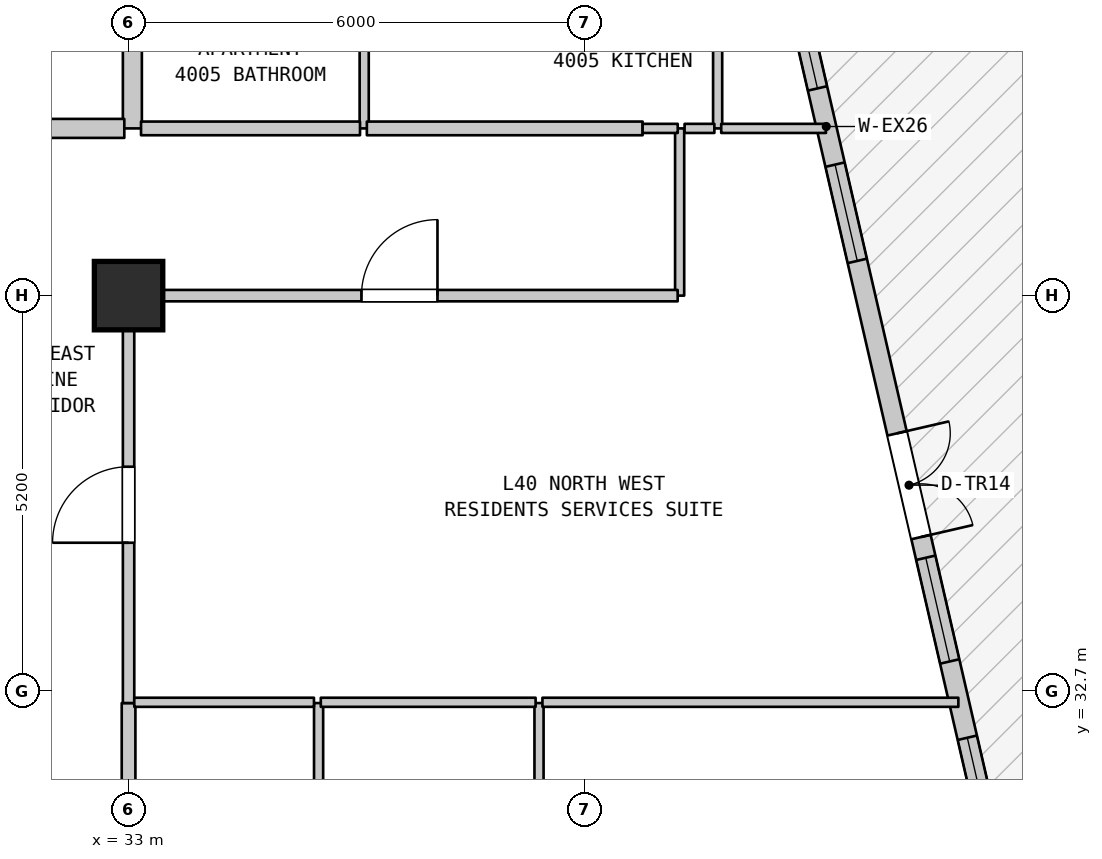
"""IFC4 building model, lengths in metres.
Left out: names, types, materials, properties, quantities, classifications, styles, units other than length and angle.
Written with IfcOpenShell. Run it as: python <this file> out.ifc"""

import sys

from ifc_helpers import new_model, si_unit, direction, frame, frame_2d, origin, origin_2d, place, context, subcontext, project, spatial, rectangle, extrude, element, fill, save


model = new_model("IFC4")
c1 = context("Model", 3, precision=1e-05, world=origin(), true_north=direction((0.0, 1.0)))
c2 = subcontext(c1, "Body", "Model", "MODEL_VIEW")
j1 = project(units=[si_unit("LENGTHUNIT", "METRE"), si_unit("PLANEANGLEUNIT", "RADIAN")], contexts=[c1])
p1 = place(None, origin())
s1 = spatial("IfcSite", under=j1, at=p1, CompositionType="ELEMENT")
p2 = place(p1, origin())
s2 = spatial("IfcBuilding", under=s1, at=p2, CompositionType="ELEMENT")
p3 = place(p2, frame((0.0, 0.0, 164.6)))
s3 = spatial("IfcBuildingStorey", under=s2, at=p3, CompositionType="ELEMENT", Elevation=164.6)
p4 = place(p3, frame((33.0, 37.9, 0.0), z_axis=(0.0, 0.0, 1.0), x_axis=(1.0, 0.0, 0.0)))
e1 = element("IfcColumn", 1, at=p4, inside=s3, PredefinedType="COLUMN", context=c2, shape_type="SweptSolid", body=[
    extrude(rectangle(XDim=0.9, YDim=0.9, at=origin_2d()), origin(), (0.0, 0.0, 1.0), 4.5),
])
p5 = place(p3, frame((39.358, 52.35, 0.0), z_axis=(0.0, 0.0, 1.0), x_axis=(0.224849558511, -0.974393491377, 0.0)))
e2 = element("IfcWall", 2, at=p5, inside=s3, PredefinedType="STANDARD", context=c2, shape_type="SweptSolid", body=[
    extrude(rectangle(XDim=25.093, YDim=0.26, at=frame_2d((12.546, 0.0))), origin(), (0.0, 0.0, 1.0), 4.19),
])
p6 = place(p5, frame((16.689, 0.0, 0.0)))
e3 = element("IfcOpeningElement", 3, at=p6, cuts=e2, PredefinedType="OPENING", context=c2, shape_type="SweptSolid", body=[
    extrude(rectangle(XDim=1.4, YDim=2.2, at=frame_2d((0.7, 1.1))), frame((0.0, 0.14, 0.0), z_axis=(0.0, -1.0, 0.0), x_axis=(1.0, 0.0, 0.0)), (0.0, 0.0, 1.0), 0.28),
])
p7 = place(p5, frame((0.915, 0.0, 0.9)))
e4 = element("IfcOpeningElement", 4, at=p7, cuts=e2, PredefinedType="OPENING", context=c2, shape_type="SweptSolid", body=[
    extrude(rectangle(XDim=1.4, YDim=1.85, at=frame_2d((0.7, 0.925))), frame((0.0, 0.14, 0.0), z_axis=(0.0, -1.0, 0.0), x_axis=(1.0, 0.0, 0.0)), (0.0, 0.0, 1.0), 0.28),
])
p8 = place(p5, frame((3.344, 0.0, 0.9)))
e5 = element("IfcOpeningElement", 5, at=p8, cuts=e2, PredefinedType="OPENING", context=c2, shape_type="SweptSolid", body=[
    extrude(rectangle(XDim=1.3, YDim=1.9, at=frame_2d((0.65, 0.95))), frame((0.0, 0.14, 0.0), z_axis=(0.0, -1.0, 0.0), x_axis=(1.0, 0.0, 0.0)), (0.0, 0.0, 1.0), 0.28),
])
p9 = place(p5, frame((5.323, 0.0, 0.9)))
e6 = element("IfcOpeningElement", 6, at=p9, cuts=e2, PredefinedType="OPENING", context=c2, shape_type="SweptSolid", body=[
    extrude(rectangle(XDim=1.4, YDim=1.85, at=frame_2d((0.7, 0.925))), frame((0.0, 0.14, 0.0), z_axis=(0.0, -1.0, 0.0), x_axis=(1.0, 0.0, 0.0)), (0.0, 0.0, 1.0), 0.28),
])
p10 = place(p5, frame((8.202, 0.0, 0.9)))
e7 = element("IfcOpeningElement", 7, at=p10, cuts=e2, PredefinedType="OPENING", context=c2, shape_type="SweptSolid", body=[
    extrude(rectangle(XDim=1.3, YDim=1.9, at=frame_2d((0.65, 0.95))), frame((0.0, 0.14, 0.0), z_axis=(0.0, -1.0, 0.0), x_axis=(1.0, 0.0, 0.0)), (0.0, 0.0, 1.0), 0.28),
])
p11 = place(p5, frame((10.632, 0.0, 0.9)))
e8 = element("IfcOpeningElement", 8, at=p11, cuts=e2, PredefinedType="OPENING", context=c2, shape_type="SweptSolid", body=[
    extrude(rectangle(XDim=1.4, YDim=1.85, at=frame_2d((0.7, 0.925))), frame((0.0, 0.14, 0.0), z_axis=(0.0, -1.0, 0.0), x_axis=(1.0, 0.0, 0.0)), (0.0, 0.0, 1.0), 0.28),
])
p12 = place(p5, frame((13.061, 0.0, 0.9)))
e9 = element("IfcOpeningElement", 9, at=p12, cuts=e2, PredefinedType="OPENING", context=c2, shape_type="SweptSolid", body=[
    extrude(rectangle(XDim=1.3, YDim=1.9, at=frame_2d((0.65, 0.95))), frame((0.0, 0.14, 0.0), z_axis=(0.0, -1.0, 0.0), x_axis=(1.0, 0.0, 0.0)), (0.0, 0.0, 1.0), 0.28),
])
p13 = place(p5, frame((18.369, 0.0, 0.9)))
e10 = element("IfcOpeningElement", 10, at=p13, cuts=e2, PredefinedType="OPENING", context=c2, shape_type="SweptSolid", body=[
    extrude(rectangle(XDim=1.4, YDim=1.85, at=frame_2d((0.7, 0.925))), frame((0.0, 0.14, 0.0), z_axis=(0.0, -1.0, 0.0), x_axis=(1.0, 0.0, 0.0)), (0.0, 0.0, 1.0), 0.28),
])
p14 = place(p5, frame((20.799, 0.0, 0.9)))
e11 = element("IfcOpeningElement", 11, at=p14, cuts=e2, PredefinedType="OPENING", context=c2, shape_type="SweptSolid", body=[
    extrude(rectangle(XDim=1.3, YDim=1.9, at=frame_2d((0.65, 0.95))), frame((0.0, 0.14, 0.0), z_axis=(0.0, -1.0, 0.0), x_axis=(1.0, 0.0, 0.0)), (0.0, 0.0, 1.0), 0.28),
])
p15 = place(p3, frame((33.0, 27.47, 0.0), z_axis=(0.0, 0.0, 1.0), x_axis=(0.0, 1.0, 0.0)))
e12 = element("IfcWall", 12, at=p15, inside=s3, PredefinedType="STANDARD", context=c2, shape_type="SweptSolid", body=[
    extrude(rectangle(XDim=5.07, YDim=0.18, at=frame_2d((2.535, 0.0))), origin(), (0.0, 0.0, 1.0), 3.69),
])
p16 = place(p3, frame((33.0, 32.54, 0.0), z_axis=(0.0, 0.0, 1.0), x_axis=(0.0, 1.0, 0.0)))
e13 = element("IfcWall", 13, at=p16, inside=s3, PredefinedType="STANDARD", context=c2, shape_type="SweptSolid", body=[
    extrude(rectangle(XDim=5.36, YDim=0.15, at=frame_2d((2.68, 0.0))), origin(), (0.0, 0.0, 1.0), 3.69),
])
p17 = place(p16, frame((2.109, 0.0, 0.0)))
e14 = element("IfcOpeningElement", 14, at=p17, cuts=e13, PredefinedType="OPENING", context=c2, shape_type="SweptSolid", body=[
    extrude(rectangle(XDim=1.0, YDim=2.15, at=frame_2d((0.5, 1.075))), frame((0.0, 0.085, 0.0), z_axis=(0.0, -1.0, 0.0), x_axis=(1.0, 0.0, 0.0)), (0.0, 0.0, 1.0), 0.17),
])
p18 = place(p3, frame((33.05, 40.1, 0.0), z_axis=(0.0, 0.0, 1.0), x_axis=(0.0, 1.0, 0.0)))
e15 = element("IfcWall", 15, at=p18, inside=s3, PredefinedType="STANDARD", context=c2, shape_type="SweptSolid", body=[
    extrude(rectangle(XDim=2.3, YDim=0.25, at=frame_2d((1.15, 0.0))), origin(), (0.0, 0.0, 1.0), 3.59),
])
p19 = place(p3, frame((35.5, 27.47, 0.0), z_axis=(0.0, 0.0, 1.0), x_axis=(0.0, 1.0, 0.0)))
e16 = element("IfcWall", 16, at=p19, inside=s3, PredefinedType="PARTITIONING", context=c2, shape_type="SweptSolid", body=[
    extrude(rectangle(XDim=5.07, YDim=0.12, at=frame_2d((2.535, 0.0))), origin(), (0.0, 0.0, 1.0), 4.19),
])
p20 = place(p3, frame((36.1, 40.1, 0.0), z_axis=(0.0, 0.0, 1.0), x_axis=(0.0, 1.0, 0.0)))
e17 = element("IfcWall", 17, at=p20, inside=s3, PredefinedType="PARTITIONING", context=c2, shape_type="SweptSolid", body=[
    extrude(rectangle(XDim=2.3, YDim=0.12, at=frame_2d((1.15, 0.0))), origin(), (0.0, 0.0, 1.0), 4.19),
])
p21 = place(p3, frame((38.4, 27.47, 0.0), z_axis=(0.0, 0.0, 1.0), x_axis=(0.0, 1.0, 0.0)))
e18 = element("IfcWall", 18, at=p21, inside=s3, PredefinedType="PARTITIONING", context=c2, shape_type="SweptSolid", body=[
    extrude(rectangle(XDim=5.07, YDim=0.12, at=frame_2d((2.535, 0.0))), origin(), (0.0, 0.0, 1.0), 4.19),
])
p22 = place(p3, frame((40.25, 37.9, 0.0), z_axis=(0.0, 0.0, 1.0), x_axis=(0.0, 1.0, 0.0)))
e19 = element("IfcWall", 19, at=p22, inside=s3, PredefinedType="PARTITIONING", context=c2, shape_type="SweptSolid", body=[
    extrude(rectangle(XDim=2.2, YDim=0.12, at=frame_2d((1.1, 0.0))), origin(), (0.0, 0.0, 1.0), 4.19),
])
p23 = place(p3, frame((40.75, 40.1, 0.0), z_axis=(0.0, 0.0, 1.0), x_axis=(0.0, 1.0, 0.0)))
e20 = element("IfcWall", 20, at=p23, inside=s3, PredefinedType="PARTITIONING", context=c2, shape_type="SweptSolid", body=[
    extrude(rectangle(XDim=2.3, YDim=0.12, at=frame_2d((1.15, 0.0))), origin(), (0.0, 0.0, 1.0), 4.19),
])
p24 = place(p3, frame((33.075, 32.55, 0.0), z_axis=(0.0, 0.0, 1.0), x_axis=(1.0, 0.0, 0.0)))
e21 = element("IfcWall", 21, at=p24, inside=s3, PredefinedType="PARTITIONING", context=c2, shape_type="SweptSolid", body=[
    extrude(rectangle(XDim=2.364, YDim=0.12, at=frame_2d((1.182, 0.0))), origin(), (0.0, 0.0, 1.0), 4.19),
])
p25 = place(p3, frame((35.529, 32.55, 0.0), z_axis=(0.0, 0.0, 1.0), x_axis=(1.0, 0.0, 0.0)))
e22 = element("IfcWall", 22, at=p25, inside=s3, PredefinedType="PARTITIONING", context=c2, shape_type="SweptSolid", body=[
    extrude(rectangle(XDim=2.826, YDim=0.12, at=frame_2d((1.413, 0.0))), origin(), (0.0, 0.0, 1.0), 4.19),
])
p26 = place(p3, frame((38.445, 32.55, 0.0), z_axis=(0.0, 0.0, 1.0), x_axis=(1.0, 0.0, 0.0)))
e23 = element("IfcWall", 23, at=p26, inside=s3, PredefinedType="PARTITIONING", context=c2, shape_type="SweptSolid", body=[
    extrude(rectangle(XDim=5.472, YDim=0.12, at=frame_2d((2.736, 0.0))), origin(), (0.0, 0.0, 1.0), 4.19),
])
p27 = place(p3, frame((33.06, 37.9, 0.0), z_axis=(0.0, 0.0, 1.0), x_axis=(1.0, 0.0, 0.0)))
e24 = element("IfcWall", 24, at=p27, inside=s3, PredefinedType="STANDARD", context=c2, shape_type="SweptSolid", body=[
    extrude(rectangle(XDim=7.164, YDim=0.15, at=frame_2d((3.582, 0.0))), origin(), (0.0, 0.0, 1.0), 4.19),
])
p28 = place(p27, frame((3.004, 0.0, 0.0)))
e25 = element("IfcOpeningElement", 25, at=p28, cuts=e24, PredefinedType="OPENING", context=c2, shape_type="SweptSolid", body=[
    extrude(rectangle(XDim=1.0, YDim=2.15, at=frame_2d((0.5, 1.075))), frame((0.0, 0.085, 0.0), z_axis=(0.0, -1.0, 0.0), x_axis=(1.0, 0.0, 0.0)), (0.0, 0.0, 1.0), 0.17),
])
p29 = place(p3, frame((30.02, 40.1, 0.0), z_axis=(0.0, 0.0, 1.0), x_axis=(1.0, 0.0, 0.0)))
e26 = element("IfcWall", 26, at=p29, inside=s3, PredefinedType="STANDARD", context=c2, shape_type="SweptSolid", body=[
    extrude(rectangle(XDim=2.924, YDim=0.25, at=frame_2d((1.462, 0.0))), origin(), (0.0, 0.0, 1.0), 4.19),
])
p30 = place(p3, frame((33.164, 40.1, 0.0), z_axis=(0.0, 0.0, 1.0), x_axis=(1.0, 0.0, 0.0)))
e27 = element("IfcWall", 27, at=p30, inside=s3, PredefinedType="STANDARD", context=c2, shape_type="SweptSolid", body=[
    extrude(rectangle(XDim=2.881, YDim=0.18, at=frame_2d((1.44, 0.0))), origin(), (0.0, 0.0, 1.0), 4.19),
])
p31 = place(p3, frame((36.135, 40.1, 0.0), z_axis=(0.0, 0.0, 1.0), x_axis=(1.0, 0.0, 0.0)))
e28 = element("IfcWall", 28, at=p31, inside=s3, PredefinedType="STANDARD", context=c2, shape_type="SweptSolid", body=[
    extrude(rectangle(XDim=3.628, YDim=0.18, at=frame_2d((1.814, 0.0))), origin(), (0.0, 0.0, 1.0), 4.19),
])
p32 = place(p3, frame((39.763, 40.1, 0.0), z_axis=(0.0, 0.0, 1.0), x_axis=(1.0, 0.0, 0.0)))
e29 = element("IfcWall", 29, at=p32, inside=s3, PredefinedType="PARTITIONING", context=c2, shape_type="SweptSolid", body=[
    extrude(rectangle(XDim=0.462, YDim=0.12, at=frame_2d((0.231, 0.0))), origin(), (0.0, 0.0, 1.0), 4.19),
])
p33 = place(p3, frame((40.315, 40.1, 0.0), z_axis=(0.0, 0.0, 1.0), x_axis=(1.0, 0.0, 0.0)))
e30 = element("IfcWall", 30, at=p33, inside=s3, PredefinedType="PARTITIONING", context=c2, shape_type="SweptSolid", body=[
    extrude(rectangle(XDim=0.392, YDim=0.12, at=frame_2d((0.196, 0.0))), origin(), (0.0, 0.0, 1.0), 4.19),
])
p34 = place(p3, frame((40.797, 40.1, 0.0), z_axis=(0.0, 0.0, 1.0), x_axis=(1.0, 0.0, 0.0)))
e31 = element("IfcWall", 31, at=p34, inside=s3, PredefinedType="PARTITIONING", context=c2, shape_type="SweptSolid", body=[
    extrude(rectangle(XDim=1.378, YDim=0.12, at=frame_2d((0.689, 0.0))), origin(), (0.0, 0.0, 1.0), 4.19),
])
p35 = place(p6, origin())
e32 = element("IfcDoor", 32, at=p35, inside=s3, OperationType="DOUBLE_DOOR_SINGLE_SWING", PredefinedType="DOOR", context=c2, shape_type="SweptSolid", body=[
    extrude(rectangle(XDim=1.4, YDim=2.2, at=frame_2d((0.7, 1.1))), frame((0.0, 0.025, 0.0), z_axis=(0.0, -1.0, 0.0), x_axis=(1.0, 0.0, 0.0)), (0.0, 0.0, 1.0), 0.05),
])
fill(e3, e32)
p36 = place(p11, origin())
e33 = element("IfcWindow", 33, at=p36, inside=s3, PartitioningType="SINGLE_PANEL", PredefinedType="WINDOW", context=c2, shape_type="SweptSolid", body=[
    extrude(rectangle(XDim=1.4, YDim=1.85, at=frame_2d((0.7, 0.925))), frame((0.0, 0.03, 0.0), z_axis=(0.0, -1.0, 0.0), x_axis=(1.0, 0.0, 0.0)), (0.0, 0.0, 1.0), 0.06),
])
fill(e8, e33)
p37 = place(p12, origin())
e34 = element("IfcWindow", 34, at=p37, inside=s3, PartitioningType="SINGLE_PANEL", PredefinedType="WINDOW", context=c2, shape_type="SweptSolid", body=[
    extrude(rectangle(XDim=1.3, YDim=1.9, at=frame_2d((0.65, 0.95))), frame((0.0, 0.03, 0.0), z_axis=(0.0, -1.0, 0.0), x_axis=(1.0, 0.0, 0.0)), (0.0, 0.0, 1.0), 0.06),
])
fill(e9, e34)
p38 = place(p13, origin())
e35 = element("IfcWindow", 35, at=p38, inside=s3, PartitioningType="SINGLE_PANEL", PredefinedType="WINDOW", context=c2, shape_type="SweptSolid", body=[
    extrude(rectangle(XDim=1.4, YDim=1.85, at=frame_2d((0.7, 0.925))), frame((0.0, 0.03, 0.0), z_axis=(0.0, -1.0, 0.0), x_axis=(1.0, 0.0, 0.0)), (0.0, 0.0, 1.0), 0.06),
])
fill(e10, e35)
p39 = place(p14, origin())
e36 = element("IfcWindow", 36, at=p39, inside=s3, PartitioningType="SINGLE_PANEL", PredefinedType="WINDOW", context=c2, shape_type="SweptSolid", body=[
    extrude(rectangle(XDim=1.3, YDim=1.9, at=frame_2d((0.65, 0.95))), frame((0.0, 0.03, 0.0), z_axis=(0.0, -1.0, 0.0), x_axis=(1.0, 0.0, 0.0)), (0.0, 0.0, 1.0), 0.06),
])
fill(e11, e36)
p40 = place(p17, origin())
e37 = element("IfcDoor", 37, at=p40, inside=s3, OperationType="SINGLE_SWING_LEFT", PredefinedType="DOOR", context=c2, shape_type="SweptSolid", body=[
    extrude(rectangle(XDim=1.0, YDim=2.15, at=frame_2d((0.5, 1.075))), frame((0.0, 0.025, 0.0), z_axis=(0.0, -1.0, 0.0), x_axis=(1.0, 0.0, 0.0)), (0.0, 0.0, 1.0), 0.05),
])
fill(e14, e37)
p41 = place(p28, origin())
e38 = element("IfcDoor", 38, at=p41, inside=s3, OperationType="SINGLE_SWING_RIGHT", PredefinedType="DOOR", context=c2, shape_type="SweptSolid", body=[
    extrude(rectangle(XDim=1.0, YDim=2.15, at=frame_2d((0.5, 1.075))), frame((0.0, 0.025, 0.0), z_axis=(0.0, -1.0, 0.0), x_axis=(1.0, 0.0, 0.0)), (0.0, 0.0, 1.0), 0.05),
])
fill(e25, e38)
save(model, sys.argv[1])
